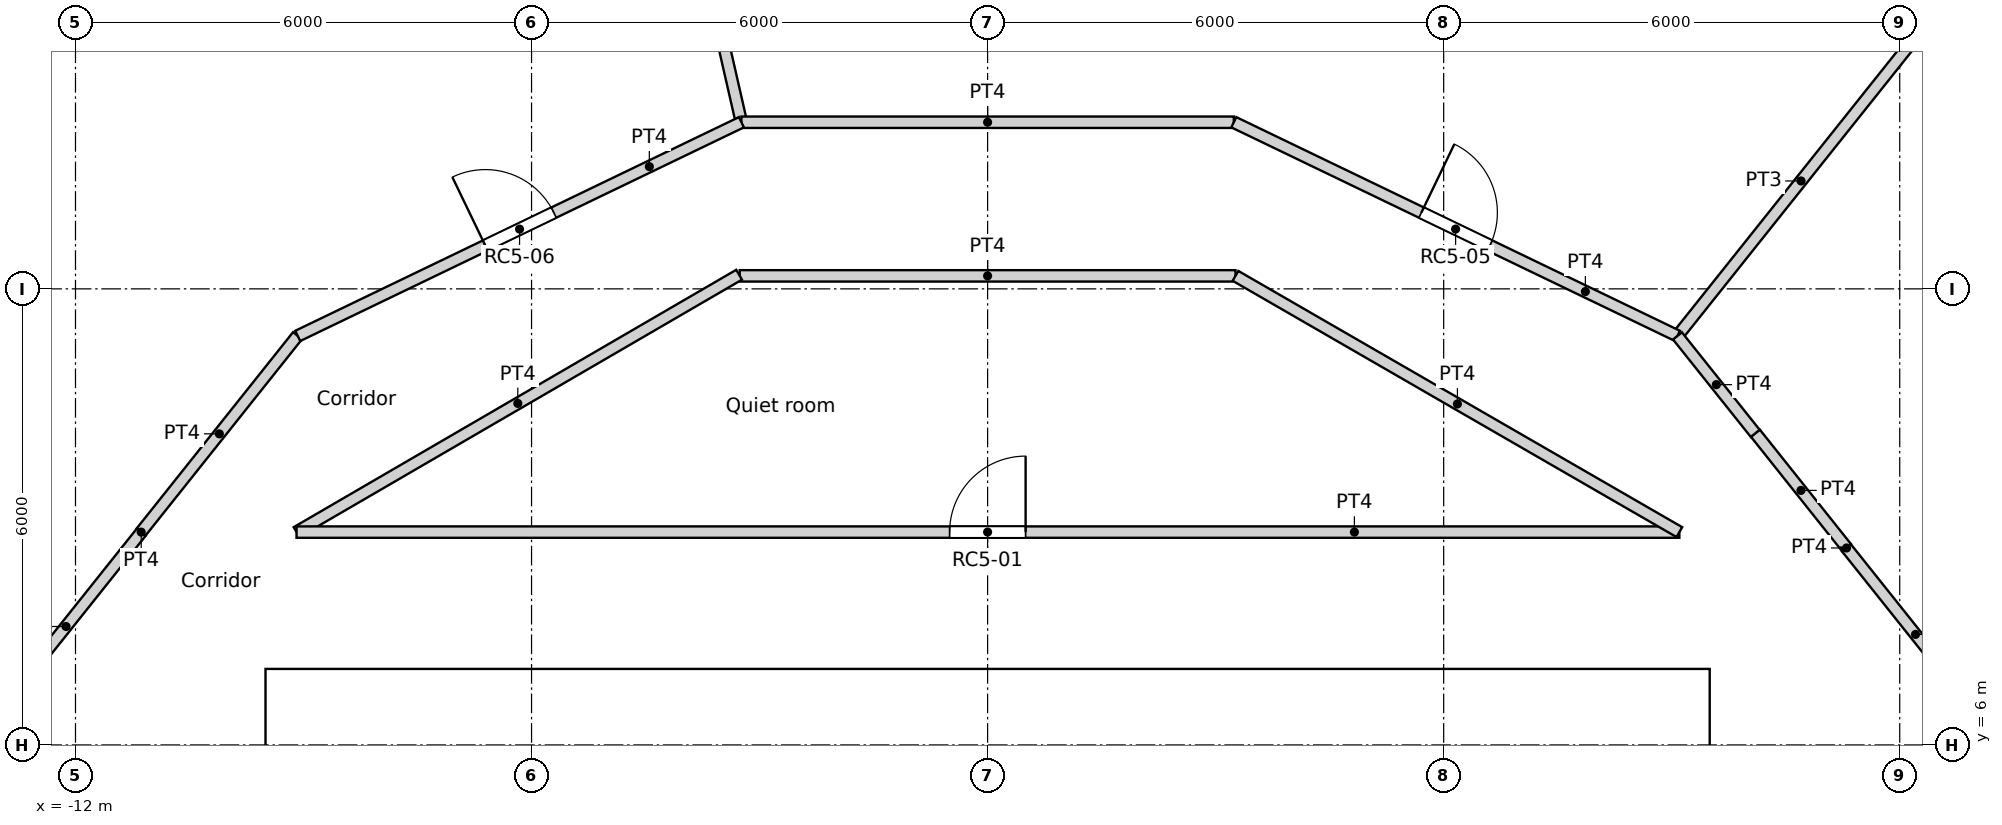
"""IFC4 building model, lengths in metres.
Left out: names, types, materials, properties, quantities, classifications, styles, units other than length and angle.
Written with IfcOpenShell. Run it as: python <this file> out.ifc"""

import sys

from ifc_helpers import new_model, si_unit, direction, frame, frame_2d, origin, origin_2d, place, context, subcontext, project, spatial, rectangle, circle, extrude, element, fill, save


model = new_model("IFC4")
c1 = context("Model", 3, precision=1e-05, world=origin(), true_north=direction((0.0, 1.0)))
c2 = subcontext(c1, "Body", "Model", "MODEL_VIEW")
j1 = project(units=[si_unit("LENGTHUNIT", "METRE"), si_unit("PLANEANGLEUNIT", "RADIAN")], contexts=[c1])
p1 = place(None, origin())
s1 = spatial("IfcSite", under=j1, at=p1, CompositionType="ELEMENT")
p2 = place(p1, origin())
s2 = spatial("IfcBuilding", under=s1, at=p2, CompositionType="ELEMENT")
p3 = place(p2, frame((0.0, 0.0, 270.6)))
s3 = spatial("IfcBuildingStorey", under=s2, at=p3, CompositionType="ELEMENT", Elevation=270.6)
p4 = place(p3, frame((11.735, 14.716, 0.0), z_axis=(0.0, 0.0, 1.0), x_axis=(1.0, 0.0, 0.0)))
e1 = element("IfcColumn", 1, at=p4, inside=s3, PredefinedType="COLUMN", context=c2, shape_type="SweptSolid", body=[
    extrude(circle(Radius=0.55, at=origin_2d()), origin(), (0.0, 0.0, 1.0), 3.6),
])
p5 = place(p3, frame((-9.5, 6.7, 0.0), z_axis=(0.0, 0.0, 1.0), x_axis=(1.0, 0.0, 0.0)))
e2 = element("IfcWall", 2, at=p5, inside=s3, PredefinedType="SOLIDWALL", context=c2, shape_type="SweptSolid", body=[
    extrude(rectangle(XDim=19.0, YDim=0.6, at=frame_2d((9.5, 0.0))), origin(), (0.0, 0.0, 1.0), 3.6),
])
p6 = place(p5, frame((5.35, 0.0, 0.0)))
e3 = element("IfcOpeningElement", 3, at=p6, cuts=e2, PredefinedType="OPENING", context=c2, shape_type="SweptSolid", body=[
    extrude(rectangle(XDim=1.7, YDim=2.1, at=frame_2d((0.85, 1.05))), frame((0.0, 0.3, 0.0), z_axis=(0.0, -1.0, 0.0), x_axis=(1.0, 0.0, 0.0)), (0.0, 0.0, 1.0), 0.6),
])
p7 = place(p3, frame((-9.2, -6.4, 0.0), z_axis=(0.0, 0.0, 1.0), x_axis=(0.0, 1.0, 0.0)))
e4 = element("IfcWall", 4, at=p7, inside=s3, PredefinedType="SOLIDWALL", context=c2, shape_type="SweptSolid", body=[
    extrude(rectangle(XDim=12.8, YDim=0.6, at=frame_2d((6.4, 0.0))), origin(), (0.0, 0.0, 1.0), 3.6),
])
p8 = place(p3, frame((9.2, -6.4, 0.0), z_axis=(0.0, 0.0, 1.0), x_axis=(0.0, 1.0, 0.0)))
e5 = element("IfcWall", 5, at=p8, inside=s3, PredefinedType="SOLIDWALL", context=c2, shape_type="SweptSolid", body=[
    extrude(rectangle(XDim=12.8, YDim=0.6, at=frame_2d((6.4, 0.0))), origin(), (0.0, 0.0, 1.0), 3.6),
])
p9 = place(p8, frame((6.4, 0.0, 0.0)))
e6 = element("IfcOpeningElement", 6, at=p9, cuts=e5, PredefinedType="OPENING", context=c2, shape_type="SweptSolid", body=[
    extrude(rectangle(XDim=1.8, YDim=2.1, at=frame_2d((0.9, 1.05))), frame((0.0, 0.3, 0.0), z_axis=(0.0, -1.0, 0.0), x_axis=(1.0, 0.0, 0.0)), (0.0, 0.0, 1.0), 0.6),
])
for number, where, z_axis, x_axis in (
    (7, (-2.25, 3.25, 0.0), (0.0, 0.0, 1.0), (0.0, 1.0, 0.0)),
    (8, (0.55, 3.25, 0.0), (0.0, 0.0, 1.0), (0.0, 1.0, 0.0)),
    (9, (3.35, 3.25, 0.0), (0.0, 0.0, 1.0), (0.0, 1.0, 0.0)),
    (10, (6.15, 3.25, 0.0), (0.0, 0.0, 1.0), (0.0, 1.0, 0.0)),
):
    element("IfcWall", number, at=place(p3, frame(where, z_axis=z_axis, x_axis=x_axis)), inside=s3, PredefinedType="SOLIDWALL", context=c2, shape_type="SweptSolid", body=[
        extrude(rectangle(XDim=3.15, YDim=0.3, at=frame_2d((1.575, 0.0))), origin(), (0.0, 0.0, 1.0), 3.25),
    ])
p10 = place(p3, frame((-9.092, 8.8, 0.0), z_axis=(0.0, 0.0, 1.0), x_axis=(0.864470922103, 0.502682827277, 0.0)))
e11 = element("IfcWall", 11, at=p10, inside=s3, PredefinedType="PARTITIONING", context=c2, shape_type="SweptSolid", body=[
    extrude(rectangle(XDim=6.735, YDim=0.15, at=frame_2d((3.368, 0.0))), origin(), (0.0, 0.0, 1.0), 3.1),
])
p11 = place(p3, frame((-9.092, 8.8, 0.0), z_axis=(0.0, 0.0, 1.0), x_axis=(1.0, 0.0, 0.0)))
e12 = element("IfcWall", 12, at=p11, inside=s3, PredefinedType="PARTITIONING", context=c2, shape_type="SweptSolid", body=[
    extrude(rectangle(XDim=18.193, YDim=0.15, at=frame_2d((9.096, 0.0))), origin(), (0.0, 0.0, 1.0), 3.1),
])
p12 = place(p11, frame((8.592, 0.0, 0.0)))
e13 = element("IfcOpeningElement", 13, at=p12, cuts=e12, PredefinedType="OPENING", context=c2, shape_type="SweptSolid", body=[
    extrude(rectangle(XDim=1.0, YDim=2.04, at=frame_2d((0.5, 1.02))), frame((0.0, 0.075, 0.0), z_axis=(0.0, -1.0, 0.0), x_axis=(1.0, 0.0, 0.0)), (0.0, 0.0, 1.0), 0.15),
])
p13 = place(p3, frame((10.101, 10.101, 0.0), z_axis=(0.0, 0.0, 1.0), x_axis=(0.623130947784, -0.782117524362, 0.0)))
e14 = element("IfcWall", 14, at=p13, inside=s3, PredefinedType="PARTITIONING", context=c2, shape_type="SweptSolid", body=[
    extrude(rectangle(XDim=1.924, YDim=0.15, at=frame_2d((0.962, 0.0))), origin(), (0.0, 0.0, 1.0), 3.1),
])
p14 = place(p3, frame((11.3, 8.586, 0.0), z_axis=(0.0, 0.0, 1.0), x_axis=(0.0, 1.0, 0.0)))
e15 = element("IfcWall", 15, at=p14, inside=s3, PredefinedType="PARTITIONING", context=c2, shape_type="SweptSolid", body=[
    extrude(rectangle(XDim=0.01, YDim=0.15, at=frame_2d((0.005, 0.0))), origin(), (0.0, 0.0, 1.0), 3.1),
])
p15 = place(p3, frame((-11.134, 8.8, 0.0), z_axis=(0.0, 0.0, 1.0), x_axis=(-1.0, 0.0, 0.0)))
e16 = element("IfcWall", 16, at=p15, inside=s3, PredefinedType="PARTITIONING", context=c2, shape_type="SweptSolid", body=[
    extrude(rectangle(XDim=0.003, YDim=0.15, at=frame_2d((0.001, 0.0))), origin(), (0.0, 0.0, 1.0), 3.1),
])
p16 = place(p3, frame((-11.136, 8.802, 0.0), z_axis=(0.0, 0.0, 1.0), x_axis=(0.623151397235, 0.782101231379, 0.0)))
e17 = element("IfcWall", 17, at=p16, inside=s3, PredefinedType="PARTITIONING", context=c2, shape_type="SweptSolid", body=[
    extrude(rectangle(XDim=3.301, YDim=0.15, at=frame_2d((1.65, 0.0))), origin(), (0.0, 0.0, 1.0), 3.1),
])
p17 = place(p3, frame((11.3, 8.592, 0.0), z_axis=(0.0, 0.0, 1.0), x_axis=(0.623446514299, -0.781866001185, 0.0)))
e18 = element("IfcWall", 18, at=p17, inside=s3, PredefinedType="PARTITIONING", context=c2, shape_type="SweptSolid", body=[
    extrude(rectangle(XDim=2.911, YDim=0.15, at=frame_2d((1.456, 0.0))), origin(), (0.0, 0.0, 1.0), 3.1),
])
p18 = place(p3, frame((3.261, 12.171, 0.0), z_axis=(0.0, 0.0, 1.0), x_axis=(0.866066809554, -0.499928276245, 0.0)))
e19 = element("IfcWall", 19, at=p18, inside=s3, PredefinedType="PARTITIONING", context=c2, shape_type="SweptSolid", body=[
    extrude(rectangle(XDim=6.743, YDim=0.15, at=frame_2d((3.371, 0.0))), origin(), (0.0, 0.0, 1.0), 3.1),
])
p19 = place(p3, frame((-3.261, 12.171, 0.0), z_axis=(0.0, 0.0, 1.0), x_axis=(1.0, 0.0, 0.0)))
e20 = element("IfcWall", 20, at=p19, inside=s3, PredefinedType="PARTITIONING", context=c2, shape_type="SweptSolid", body=[
    extrude(rectangle(XDim=6.522, YDim=0.15, at=frame_2d((3.261, 0.0))), origin(), (0.0, 0.0, 1.0), 3.1),
])
p20 = place(p3, frame((9.076, 11.381, 0.0), z_axis=(0.0, 0.0, 1.0), x_axis=(0.623805208652, -0.781579849829, 0.0)))
e21 = element("IfcWall", 21, at=p20, inside=s3, PredefinedType="PARTITIONING", context=c2, shape_type="SweptSolid", body=[
    extrude(rectangle(XDim=1.64, YDim=0.15, at=frame_2d((0.82, 0.0))), origin(), (0.0, 0.0, 1.0), 3.1),
])
p21 = place(p3, frame((-3.239, 14.192, 0.0), z_axis=(0.0, 0.0, 1.0), x_axis=(1.0, 0.0, 0.0)))
e22 = element("IfcWall", 22, at=p21, inside=s3, PredefinedType="PARTITIONING", context=c2, shape_type="SweptSolid", body=[
    extrude(rectangle(XDim=6.478, YDim=0.15, at=frame_2d((3.239, 0.0))), origin(), (0.0, 0.0, 1.0), 3.1),
])
p22 = place(p3, frame((3.239, 14.192, 0.0), z_axis=(0.0, 0.0, 1.0), x_axis=(0.900976027191, -0.433868872388, 0.0)))
e23 = element("IfcWall", 23, at=p22, inside=s3, PredefinedType="PARTITIONING", context=c2, shape_type="SweptSolid", body=[
    extrude(rectangle(XDim=6.479, YDim=0.15, at=frame_2d((3.239, 0.0))), origin(), (0.0, 0.0, 1.0), 3.1),
])
p23 = place(p22, frame((2.739, 0.0, 0.0)))
e24 = element("IfcOpeningElement", 24, at=p23, cuts=e23, PredefinedType="OPENING", context=c2, shape_type="SweptSolid", body=[
    extrude(rectangle(XDim=1.0, YDim=2.04, at=frame_2d((0.5, 1.02))), frame((0.0, 0.075, 0.0), z_axis=(0.0, -1.0, 0.0), x_axis=(1.0, 0.0, 0.0)), (0.0, 0.0, 1.0), 0.15),
])
p24 = place(p3, frame((-9.076, 11.381, 0.0), z_axis=(0.0, 0.0, 1.0), x_axis=(0.900976027191, 0.433868872388, 0.0)))
e25 = element("IfcWall", 25, at=p24, inside=s3, PredefinedType="PARTITIONING", context=c2, shape_type="SweptSolid", body=[
    extrude(rectangle(XDim=6.479, YDim=0.15, at=frame_2d((3.239, 0.0))), origin(), (0.0, 0.0, 1.0), 3.1),
])
p25 = place(p24, frame((2.739, 0.0, 0.0)))
e26 = element("IfcOpeningElement", 26, at=p25, cuts=e25, PredefinedType="OPENING", context=c2, shape_type="SweptSolid", body=[
    extrude(rectangle(XDim=1.0, YDim=2.04, at=frame_2d((0.5, 1.02))), frame((0.0, 0.075, 0.0), z_axis=(0.0, -1.0, 0.0), x_axis=(1.0, 0.0, 0.0)), (0.0, 0.0, 1.0), 0.15),
])
p26 = place(p3, frame((-13.115, 6.316, 0.0), z_axis=(0.0, 0.0, 1.0), x_axis=(0.623476099415, 0.781842409606, 0.0)))
e27 = element("IfcWall", 27, at=p26, inside=s3, PredefinedType="PARTITIONING", context=c2, shape_type="SweptSolid", body=[
    extrude(rectangle(XDim=3.177, YDim=0.15, at=frame_2d((1.589, 0.0))), origin(), (0.0, 0.0, 1.0), 3.1),
])
p27 = place(p3, frame((9.076, 11.381, 0.0), z_axis=(0.0, 0.0, 1.0), x_axis=(0.623460949534, 0.781854490558, 0.0)))
e28 = element("IfcWall", 28, at=p27, inside=s3, PredefinedType="PARTITIONING", context=c2, shape_type="SweptSolid", body=[
    extrude(rectangle(XDim=5.214, YDim=0.15, at=frame_2d((2.607, 0.0))), origin(), (0.0, 0.0, 1.0), 3.1),
])
p28 = place(p3, frame((-4.4, 19.276, 0.0), z_axis=(0.0, 0.0, 1.0), x_axis=(0.222612505682, -0.974907007008, 0.0)))
e29 = element("IfcWall", 29, at=p28, inside=s3, PredefinedType="PARTITIONING", context=c2, shape_type="SweptSolid", body=[
    extrude(rectangle(XDim=5.215, YDim=0.15, at=frame_2d((2.607, 0.0))), origin(), (0.0, 0.0, 1.0), 3.1),
])
p29 = place(p6, origin())
e30 = element("IfcDoor", 30, at=p29, inside=s3, OperationType="DOUBLE_DOOR_SINGLE_SWING", PredefinedType="DOOR", context=c2, shape_type="SweptSolid", body=[
    extrude(rectangle(XDim=1.7, YDim=2.1, at=frame_2d((0.85, 1.05))), frame((0.0, 0.025, 0.0), z_axis=(0.0, -1.0, 0.0), x_axis=(1.0, 0.0, 0.0)), (0.0, 0.0, 1.0), 0.05),
])
fill(e3, e30)
p30 = place(p12, origin())
e31 = element("IfcDoor", 31, at=p30, inside=s3, OperationType="SINGLE_SWING_RIGHT", PredefinedType="DOOR", context=c2, shape_type="SweptSolid", body=[
    extrude(rectangle(XDim=1.0, YDim=2.04, at=frame_2d((0.5, 1.02))), frame((0.0, 0.025, 0.0), z_axis=(0.0, -1.0, 0.0), x_axis=(1.0, 0.0, 0.0)), (0.0, 0.0, 1.0), 0.05),
])
fill(e13, e31)
p31 = place(p23, origin())
e32 = element("IfcDoor", 32, at=p31, inside=s3, OperationType="SINGLE_SWING_LEFT", PredefinedType="DOOR", context=c2, shape_type="SweptSolid", body=[
    extrude(rectangle(XDim=1.0, YDim=2.04, at=frame_2d((0.5, 1.02))), frame((0.0, 0.025, 0.0), z_axis=(0.0, -1.0, 0.0), x_axis=(1.0, 0.0, 0.0)), (0.0, 0.0, 1.0), 0.05),
])
fill(e24, e32)
p32 = place(p25, origin())
e33 = element("IfcDoor", 33, at=p32, inside=s3, OperationType="SINGLE_SWING_LEFT", PredefinedType="DOOR", context=c2, shape_type="SweptSolid", body=[
    extrude(rectangle(XDim=1.0, YDim=2.04, at=frame_2d((0.5, 1.02))), frame((0.0, 0.025, 0.0), z_axis=(0.0, -1.0, 0.0), x_axis=(1.0, 0.0, 0.0)), (0.0, 0.0, 1.0), 0.05),
])
fill(e26, e33)
save(model, sys.argv[1])
